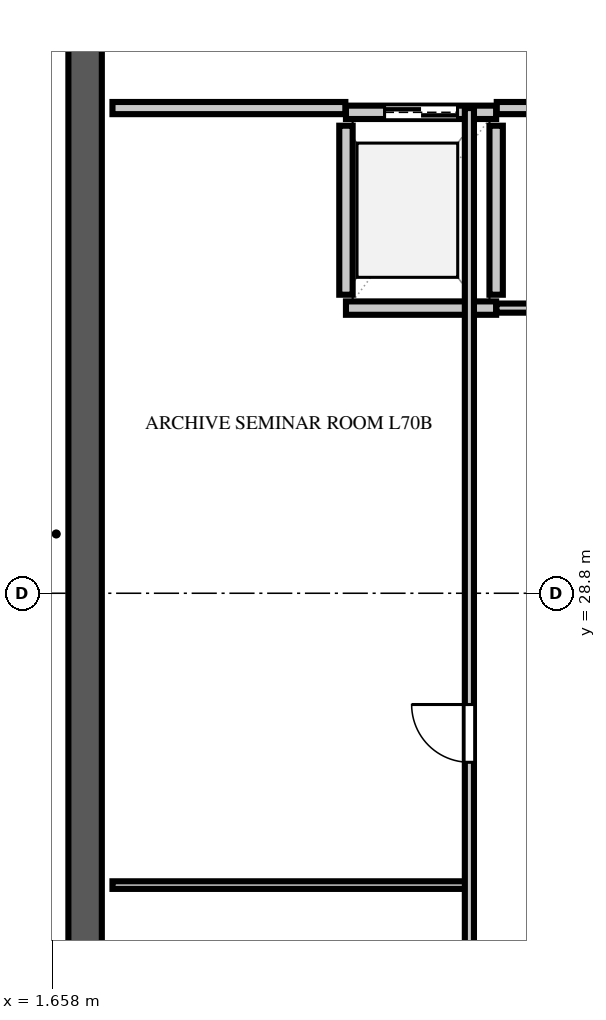
"""IFC4 building model, lengths in metres.
Left out: names, types, materials, properties, quantities, classifications, styles, units other than length and angle.
Written with IfcOpenShell. Run it as: python <this file> out.ifc"""

import sys

from ifc_helpers import new_model, si_unit, direction, frame, frame_2d, origin, place, context, subcontext, project, spatial, rectangle, extrude, element, fill, save


model = new_model("IFC4")
c1 = context("Model", 3, precision=1e-05, world=origin(), true_north=direction((0.0, 1.0)))
c2 = subcontext(c1, "Body", "Model", "MODEL_VIEW")
j1 = project(units=[si_unit("LENGTHUNIT", "METRE"), si_unit("PLANEANGLEUNIT", "RADIAN")], contexts=[c1])
p1 = place(None, origin())
s1 = spatial("IfcSite", under=j1, at=p1, CompositionType="ELEMENT")
p2 = place(p1, origin())
s2 = spatial("IfcBuilding", under=s1, at=p2, CompositionType="ELEMENT")
p3 = place(p2, frame((0.0, 0.0, 277.2)))
s3 = spatial("IfcBuildingStorey", under=s2, at=p3, CompositionType="ELEMENT", Elevation=277.2)
p4 = place(p3, frame((2.2, 9.325, 0.0), z_axis=(0.0, 0.0, 1.0), x_axis=(0.0, 1.0, 0.0)))
e1 = element("IfcWall", 1, at=p4, inside=s3, PredefinedType="SHEAR", context=c2, shape_type="SweptSolid", body=[
    extrude(rectangle(XDim=38.95, YDim=0.55, at=frame_2d((19.475, 0.0))), origin(), (0.0, 0.0, 1.0), 3.54),
])
for number, where, z_axis, x_axis in (
    (2, (6.49, 33.71, 0.0), (0.0, 0.0, 1.0), (0.0, 1.0, 0.0)),
    (3, (8.96, 33.71, 0.0), (0.0, 0.0, 1.0), (0.0, 1.0, 0.0)),
):
    element("IfcWall", number, at=place(p3, frame(where, z_axis=z_axis, x_axis=x_axis)), inside=s3, PredefinedType="SOLIDWALL", context=c2, shape_type="SweptSolid", body=[
        extrude(rectangle(XDim=2.78, YDim=0.22, at=frame_2d((1.39, 0.0))), origin(), (0.0, 0.0, 1.0), 3.54),
    ])
p5 = place(p3, frame((6.49, 33.49, 0.0), z_axis=(0.0, 0.0, 1.0), x_axis=(1.0, 0.0, 0.0)))
e4 = element("IfcWall", 4, at=p5, inside=s3, PredefinedType="SOLIDWALL", context=c2, shape_type="SweptSolid", body=[
    extrude(rectangle(XDim=2.47, YDim=0.22, at=frame_2d((1.235, 0.0))), origin(), (0.0, 0.0, 1.0), 3.54),
])
p6 = place(p3, frame((6.49, 36.71, 0.0), z_axis=(0.0, 0.0, 1.0), x_axis=(1.0, 0.0, 0.0)))
e5 = element("IfcWall", 5, at=p6, inside=s3, PredefinedType="SOLIDWALL", context=c2, shape_type="SweptSolid", body=[
    extrude(rectangle(XDim=2.47, YDim=0.22, at=frame_2d((1.235, 0.0))), origin(), (0.0, 0.0, 1.0), 3.54),
])
p7 = place(p6, frame((0.635, 0.0, 0.0)))
e6 = element("IfcOpeningElement", 6, at=p7, cuts=e5, PredefinedType="OPENING", context=c2, shape_type="SweptSolid", body=[
    extrude(rectangle(XDim=1.2, YDim=2.2, at=frame_2d((0.6, 1.1))), frame((0.0, 0.122, 0.0), z_axis=(0.0, -1.0, 0.0), x_axis=(1.0, 0.0, 0.0)), (0.0, 0.0, 1.0), 0.244),
])
p8 = place(p3, frame((2.65, 36.78, 0.0), z_axis=(0.0, 0.0, 1.0), x_axis=(1.0, 0.0, 0.0)))
e7 = element("IfcWall", 7, at=p8, inside=s3, PredefinedType="SOLIDWALL", context=c2, shape_type="SweptSolid", body=[
    extrude(rectangle(XDim=3.83, YDim=0.2, at=frame_2d((1.915, 0.0))), origin(), (0.0, 0.0, 1.0), 3.54),
])
p9 = place(p3, frame((8.97, 36.78, 0.0), z_axis=(0.0, 0.0, 1.0), x_axis=(1.0, 0.0, 0.0)))
e8 = element("IfcWall", 8, at=p9, inside=s3, PredefinedType="SOLIDWALL", context=c2, shape_type="SweptSolid", body=[
    extrude(rectangle(XDim=1.51, YDim=0.2, at=frame_2d((0.755, 0.0))), origin(), (0.0, 0.0, 1.0), 3.54),
])
p10 = place(p3, frame((8.965, 33.49, 0.0), z_axis=(0.0, 0.0, 1.0), x_axis=(1.0, 0.0, 0.0)))
e9 = element("IfcWall", 9, at=p10, inside=s3, PredefinedType="PARTITIONING", context=c2, shape_type="SweptSolid", body=[
    extrude(rectangle(XDim=1.52, YDim=0.15, at=frame_2d((0.76, 0.0))), origin(), (0.0, 0.0, 1.0), 3.54),
])
p11 = place(p3, frame((2.65, 24.0, 0.0), z_axis=(0.0, 0.0, 1.0), x_axis=(1.0, 0.0, 0.0)))
e10 = element("IfcWall", 10, at=p11, inside=s3, PredefinedType="PARTITIONING", context=c2, shape_type="SweptSolid", body=[
    extrude(rectangle(XDim=5.87, YDim=0.125, at=frame_2d((2.935, 0.0))), origin(), (0.0, 0.0, 1.0), 3.54),
])
p12 = place(p3, frame((8.52, 12.02, 0.0), z_axis=(0.0, 0.0, 1.0), x_axis=(0.0, 1.0, 0.0)))
e11 = element("IfcWall", 11, at=p12, inside=s3, PredefinedType="PARTITIONING", context=c2, shape_type="SweptSolid", body=[
    extrude(rectangle(XDim=24.76, YDim=0.15, at=frame_2d((12.38, 0.0))), origin(), (0.0, 0.0, 1.0), 3.54),
])
p13 = place(p12, frame((6.0, 0.0, 0.0)))
e12 = element("IfcOpeningElement", 12, at=p13, cuts=e11, PredefinedType="OPENING", context=c2, shape_type="SweptSolid", body=[
    extrude(rectangle(XDim=0.95, YDim=2.15, at=frame_2d((0.475, 1.075))), frame((0.0, 0.087, 0.0), z_axis=(0.0, -1.0, 0.0), x_axis=(1.0, 0.0, 0.0)), (0.0, 0.0, 1.0), 0.174),
])
p14 = place(p12, frame((14.0, 0.0, 0.0)))
e13 = element("IfcOpeningElement", 13, at=p14, cuts=e11, PredefinedType="OPENING", context=c2, shape_type="SweptSolid", body=[
    extrude(rectangle(XDim=0.95, YDim=2.15, at=frame_2d((0.475, 1.075))), frame((0.0, 0.087, 0.0), z_axis=(0.0, -1.0, 0.0), x_axis=(1.0, 0.0, 0.0)), (0.0, 0.0, 1.0), 0.174),
])
p15 = place(p7, origin())
e14 = element("IfcDoor", 14, at=p15, inside=s3, OperationType="DOUBLE_DOOR_SLIDING", PredefinedType="DOOR", context=c2, shape_type="SweptSolid", body=[
    extrude(rectangle(XDim=1.2, YDim=2.2, at=frame_2d((0.6, 1.1))), frame((0.0, 0.025, 0.0), z_axis=(0.0, -1.0, 0.0), x_axis=(1.0, 0.0, 0.0)), (0.0, 0.0, 1.0), 0.05),
])
fill(e6, e14)
p16 = place(p14, origin())
e15 = element("IfcDoor", 15, at=p16, inside=s3, OperationType="SINGLE_SWING_RIGHT", PredefinedType="DOOR", context=c2, shape_type="SweptSolid", body=[
    extrude(rectangle(XDim=0.95, YDim=2.15, at=frame_2d((0.475, 1.075))), frame((0.0, 0.025, 0.0), z_axis=(0.0, -1.0, 0.0), x_axis=(1.0, 0.0, 0.0)), (0.0, 0.0, 1.0), 0.05),
])
fill(e13, e15)
save(model, sys.argv[1])
